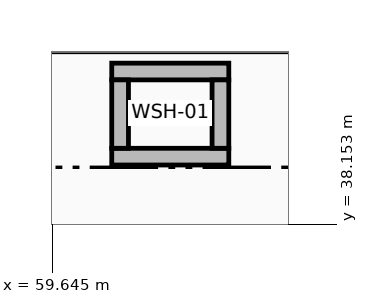
"""IFC4 building model, lengths in metres.
Left out: names, types, materials, properties, quantities, classifications, styles, units other than length and angle.
Written with IfcOpenShell. Run it as: python <this file> out.ifc"""

import sys

from ifc_helpers import new_model, si_unit, direction, frame, frame_2d, origin, place, context, subcontext, project, spatial, rectangle, extrude, element, save


model = new_model("IFC4")
c1 = context("Model", 3, precision=1e-05, world=origin(), true_north=direction((0.0, 1.0)))
c2 = subcontext(c1, "Body", "Model", "MODEL_VIEW")
j1 = project(units=[si_unit("LENGTHUNIT", "METRE"), si_unit("PLANEANGLEUNIT", "RADIAN")], contexts=[c1])
p1 = place(None, origin())
s1 = spatial("IfcSite", under=j1, at=p1, CompositionType="ELEMENT")
p2 = place(p1, origin())
s2 = spatial("IfcBuilding", under=s1, at=p2, CompositionType="ELEMENT")
p3 = place(p2, frame((0.0, 0.0, 9.0)))
s3 = spatial("IfcBuildingStorey", under=s2, at=p3, CompositionType="ELEMENT", Elevation=9.0)
for number, where, z_axis, x_axis in (
    (1, (60.43, 39.04, 0.0), (0.0, 0.0, 1.0), (1.0, 0.0, 0.0)),
    (2, (60.43, 40.16, 0.0), (0.0, 0.0, 1.0), (1.0, 0.0, 0.0)),
):
    element("IfcWall", number, at=place(p3, frame(where, z_axis=z_axis, x_axis=x_axis)), inside=s3, PredefinedType="STANDARD", context=c2, shape_type="SweptSolid", body=[
        extrude(rectangle(XDim=1.54, YDim=0.22, at=frame_2d((0.77, 0.0))), origin(), (0.0, 0.0, 1.0), 3.26),
    ])
for number, where, z_axis, x_axis in (
    (3, (60.54, 39.15, 0.0), (0.0, 0.0, 1.0), (0.0, 1.0, 0.0)),
    (4, (61.86, 39.15, 0.0), (0.0, 0.0, 1.0), (0.0, 1.0, 0.0)),
):
    element("IfcWall", number, at=place(p3, frame(where, z_axis=z_axis, x_axis=x_axis)), inside=s3, PredefinedType="STANDARD", context=c2, shape_type="SweptSolid", body=[
        extrude(rectangle(XDim=0.9, YDim=0.22, at=frame_2d((0.45, 0.0))), origin(), (0.0, 0.0, 1.0), 3.26),
    ])
save(model, sys.argv[1])
